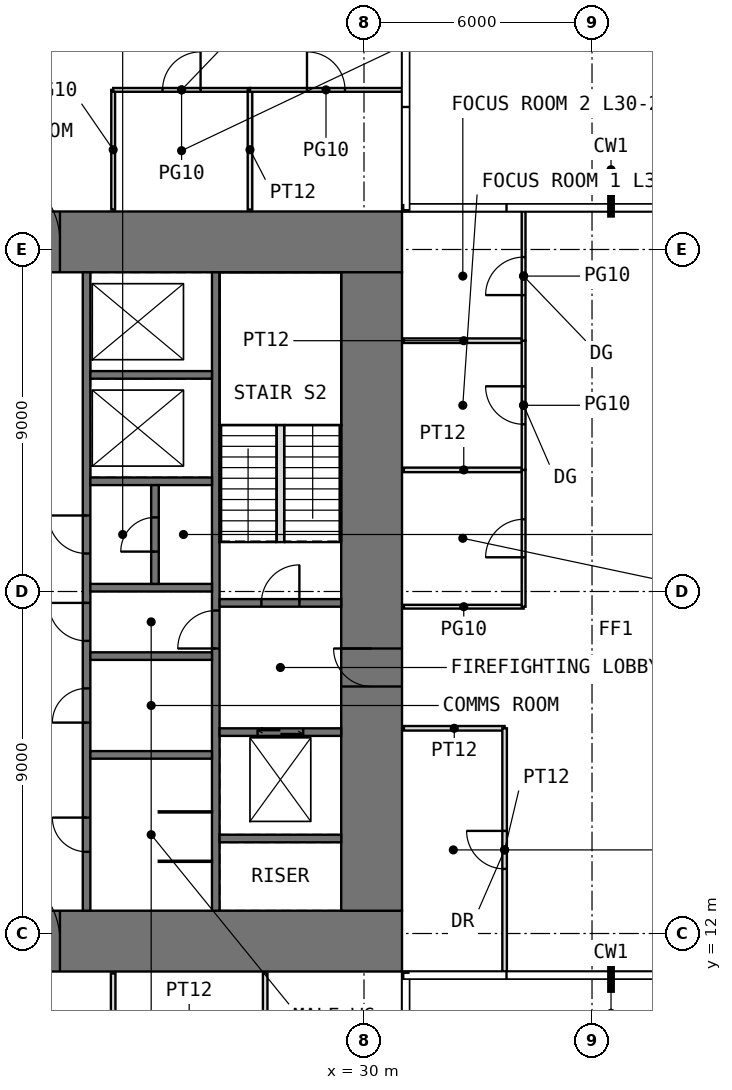
"""IFC4 building model, lengths in metres.
Left out: names, types, materials, properties, quantities, classifications, styles, units other than length and angle.
Written with IfcOpenShell. Run it as: python <this file> out.ifc"""

import sys

from ifc_helpers import new_model, si_unit, direction, frame, frame_2d, origin, place, context, subcontext, project, spatial, rectangle, extrude, element, fill, save


model = new_model("IFC4")
c1 = context("Model", 3, precision=1e-05, world=origin(), true_north=direction((0.0, 1.0)))
c2 = subcontext(c1, "Body", "Model", "MODEL_VIEW")
j1 = project(units=[si_unit("LENGTHUNIT", "METRE"), si_unit("PLANEANGLEUNIT", "RADIAN")], contexts=[c1])
p1 = place(None, origin())
s1 = spatial("IfcSite", under=j1, at=p1, CompositionType="ELEMENT")
p2 = place(p1, origin())
s2 = spatial("IfcBuilding", under=s1, at=p2, CompositionType="ELEMENT")
p3 = place(p2, frame((0.0, 0.0, 128.5)))
s3 = spatial("IfcBuildingStorey", under=s2, at=p3, CompositionType="ELEMENT", Elevation=128.5)
p4 = place(p3, frame((11.0, 11.8, -0.05), z_axis=(0.0, 0.0, 1.0), x_axis=(1.0, 0.0, 0.0)))
e1 = element("IfcWall", 1, at=p4, inside=s3, PredefinedType="SHEAR", context=c2, shape_type="SweptSolid", body=[
    extrude(rectangle(XDim=20.0, YDim=1.6, at=frame_2d((10.0, 0.0))), origin(), (0.0, 0.0, 1.0), 4.0),
])
p5 = place(p4, frame((9.0, 0.0, 0.05)))
e2 = element("IfcOpeningElement", 2, at=p5, cuts=e1, PredefinedType="OPENING", context=c2, shape_type="SweptSolid", body=[
    extrude(rectangle(XDim=2.0, YDim=2.2, at=frame_2d((1.0, 1.1))), frame((0.0, 0.81, 0.0), z_axis=(0.0, -1.0, 0.0), x_axis=(1.0, 0.0, 0.0)), (0.0, 0.0, 1.0), 1.62),
])
p6 = place(p3, frame((11.0, 30.2, -0.05), z_axis=(0.0, 0.0, 1.0), x_axis=(1.0, 0.0, 0.0)))
e3 = element("IfcWall", 3, at=p6, inside=s3, PredefinedType="SHEAR", context=c2, shape_type="SweptSolid", body=[
    extrude(rectangle(XDim=20.0, YDim=1.6, at=frame_2d((10.0, 0.0))), origin(), (0.0, 0.0, 1.0), 4.0),
])
p7 = place(p6, frame((9.0, 0.0, 0.05)))
e4 = element("IfcOpeningElement", 4, at=p7, cuts=e3, PredefinedType="OPENING", context=c2, shape_type="SweptSolid", body=[
    extrude(rectangle(XDim=2.0, YDim=2.2, at=frame_2d((1.0, 1.1))), frame((0.0, 0.81, 0.0), z_axis=(0.0, -1.0, 0.0), x_axis=(1.0, 0.0, 0.0)), (0.0, 0.0, 1.0), 1.62),
])
p8 = place(p3, frame((30.2, 12.6, -0.05), z_axis=(0.0, 0.0, 1.0), x_axis=(0.0, 1.0, 0.0)))
e5 = element("IfcWall", 5, at=p8, inside=s3, PredefinedType="SHEAR", context=c2, shape_type="SweptSolid", body=[
    extrude(rectangle(XDim=16.8, YDim=1.6, at=frame_2d((8.4, 0.0))), origin(), (0.0, 0.0, 1.0), 4.0),
])
p9 = place(p8, frame((5.9, 0.0, 0.05)))
e6 = element("IfcOpeningElement", 6, at=p9, cuts=e5, PredefinedType="OPENING", context=c2, shape_type="SweptSolid", body=[
    extrude(rectangle(XDim=1.0, YDim=2.2, at=frame_2d((0.5, 1.1))), frame((0.0, 0.81, 0.0), z_axis=(0.0, -1.0, 0.0), x_axis=(1.0, 0.0, 0.0)), (0.0, 0.0, 1.0), 1.62),
])
p10 = place(p3, frame((22.7, 12.6, -0.05), z_axis=(0.0, 0.0, 1.0), x_axis=(0.0, 1.0, 0.0)))
e7 = element("IfcWall", 7, at=p10, inside=s3, PredefinedType="SHEAR", context=c2, shape_type="SweptSolid", body=[
    extrude(rectangle(XDim=16.8, YDim=0.2, at=frame_2d((8.4, 0.0))), origin(), (0.0, 0.0, 1.0), 4.0),
])
p11 = place(p10, frame((7.1, 0.0, 0.05)))
e8 = element("IfcOpeningElement", 8, at=p11, cuts=e7, PredefinedType="OPENING", context=c2, shape_type="SweptSolid", body=[
    extrude(rectangle(XDim=1.0, YDim=2.2, at=frame_2d((0.5, 1.1))), frame((0.0, 0.11, 0.0), z_axis=(0.0, -1.0, 0.0), x_axis=(1.0, 0.0, 0.0)), (0.0, 0.0, 1.0), 0.22),
])
p12 = place(p10, frame((1.55, 0.0, 0.05)))
e9 = element("IfcOpeningElement", 9, at=p12, cuts=e7, PredefinedType="OPENING", context=c2, shape_type="SweptSolid", body=[
    extrude(rectangle(XDim=0.9, YDim=2.2, at=frame_2d((0.45, 1.1))), frame((0.0, 0.11, 0.0), z_axis=(0.0, -1.0, 0.0), x_axis=(1.0, 0.0, 0.0)), (0.0, 0.0, 1.0), 0.22),
])
p13 = place(p10, frame((4.95, 0.0, 0.05)))
e10 = element("IfcOpeningElement", 10, at=p13, cuts=e7, PredefinedType="OPENING", context=c2, shape_type="SweptSolid", body=[
    extrude(rectangle(XDim=0.9, YDim=2.2, at=frame_2d((0.45, 1.1))), frame((0.0, 0.11, 0.0), z_axis=(0.0, -1.0, 0.0), x_axis=(1.0, 0.0, 0.0)), (0.0, 0.0, 1.0), 0.22),
])
p14 = place(p10, frame((9.4, 0.0, 0.05)))
e11 = element("IfcOpeningElement", 11, at=p14, cuts=e7, PredefinedType="OPENING", context=c2, shape_type="SweptSolid", body=[
    extrude(rectangle(XDim=1.0, YDim=2.2, at=frame_2d((0.5, 1.1))), frame((0.0, 0.11, 0.0), z_axis=(0.0, -1.0, 0.0), x_axis=(1.0, 0.0, 0.0)), (0.0, 0.0, 1.0), 0.22),
])
p15 = place(p3, frame((26.1, 12.6, -0.05), z_axis=(0.0, 0.0, 1.0), x_axis=(0.0, 1.0, 0.0)))
e12 = element("IfcWall", 12, at=p15, inside=s3, PredefinedType="SHEAR", context=c2, shape_type="SweptSolid", body=[
    extrude(rectangle(XDim=16.8, YDim=0.2, at=frame_2d((8.4, 0.0))), origin(), (0.0, 0.0, 1.0), 4.0),
])
p16 = place(p15, frame((6.9, 0.0, 0.05)))
e13 = element("IfcOpeningElement", 13, at=p16, cuts=e12, PredefinedType="OPENING", context=c2, shape_type="SweptSolid", body=[
    extrude(rectangle(XDim=1.0, YDim=2.2, at=frame_2d((0.5, 1.1))), frame((0.0, 0.11, 0.0), z_axis=(0.0, -1.0, 0.0), x_axis=(1.0, 0.0, 0.0)), (0.0, 0.0, 1.0), 0.22),
])
for number, where, z_axis, x_axis in (
    (14, (22.8, 16.7, -0.05), (0.0, 0.0, 1.0), (1.0, 0.0, 0.0)),
    (15, (22.8, 19.3, -0.05), (0.0, 0.0, 1.0), (1.0, 0.0, 0.0)),
    (16, (22.8, 21.1, -0.05), (0.0, 0.0, 1.0), (1.0, 0.0, 0.0)),
    (17, (22.8, 23.9, -0.05), (0.0, 0.0, 1.0), (1.0, 0.0, 0.0)),
    (18, (22.8, 26.7, -0.05), (0.0, 0.0, 1.0), (1.0, 0.0, 0.0)),
    (19, (26.2, 14.5, -0.05), (0.0, 0.0, 1.0), (1.0, 0.0, 0.0)),
):
    element("IfcWall", number, at=place(p3, frame(where, z_axis=z_axis, x_axis=x_axis)), inside=s3, PredefinedType="SHEAR", context=c2, shape_type="SweptSolid", body=[
        extrude(rectangle(XDim=3.2, YDim=0.2, at=frame_2d((1.6, 0.0))), origin(), (0.0, 0.0, 1.0), 4.0),
    ])
p17 = place(p3, frame((26.2, 17.3, -0.05), z_axis=(0.0, 0.0, 1.0), x_axis=(1.0, 0.0, 0.0)))
e20 = element("IfcWall", 20, at=p17, inside=s3, PredefinedType="SHEAR", context=c2, shape_type="SweptSolid", body=[
    extrude(rectangle(XDim=3.2, YDim=0.2, at=frame_2d((1.6, 0.0))), origin(), (0.0, 0.0, 1.0), 4.0),
])
p18 = place(p17, frame((1.0, 0.0, 0.05)))
e21 = element("IfcOpeningElement", 21, at=p18, cuts=e20, PredefinedType="OPENING", context=c2, shape_type="SweptSolid", body=[
    extrude(rectangle(XDim=1.2, YDim=2.2, at=frame_2d((0.6, 1.1))), frame((0.0, 0.11, 0.0), z_axis=(0.0, -1.0, 0.0), x_axis=(1.0, 0.0, 0.0)), (0.0, 0.0, 1.0), 0.22),
])
p19 = place(p3, frame((26.2, 20.7, -0.05), z_axis=(0.0, 0.0, 1.0), x_axis=(1.0, 0.0, 0.0)))
e22 = element("IfcWall", 22, at=p19, inside=s3, PredefinedType="SHEAR", context=c2, shape_type="SweptSolid", body=[
    extrude(rectangle(XDim=3.2, YDim=0.2, at=frame_2d((1.6, 0.0))), origin(), (0.0, 0.0, 1.0), 4.0),
])
p20 = place(p19, frame((1.1, 0.0, 0.05)))
e23 = element("IfcOpeningElement", 23, at=p20, cuts=e22, PredefinedType="OPENING", context=c2, shape_type="SweptSolid", body=[
    extrude(rectangle(XDim=1.0, YDim=2.2, at=frame_2d((0.5, 1.1))), frame((0.0, 0.11, 0.0), z_axis=(0.0, -1.0, 0.0), x_axis=(1.0, 0.0, 0.0)), (0.0, 0.0, 1.0), 0.22),
])
for number, where, z_axis, x_axis in (
    (24, (24.6, 13.9, 0.0), (0.0, 0.0, 1.0), (1.0, 0.0, 0.0)),
    (25, (24.6, 15.2, 0.0), (0.0, 0.0, 1.0), (1.0, 0.0, 0.0)),
):
    element("IfcWall", number, at=place(p3, frame(where, z_axis=z_axis, x_axis=x_axis)), inside=s3, PredefinedType="PARTITIONING", context=c2, shape_type="SweptSolid", body=[
        extrude(rectangle(XDim=1.4, YDim=0.03, at=frame_2d((0.7, 0.0))), origin(), (0.0, 0.0, 1.0), 3.75),
    ])
p21 = place(p3, frame((24.5, 21.2, -0.05), z_axis=(0.0, 0.0, 1.0), x_axis=(0.0, 1.0, 0.0)))
e26 = element("IfcWall", 26, at=p21, inside=s3, PredefinedType="SHEAR", context=c2, shape_type="SweptSolid", body=[
    extrude(rectangle(XDim=2.6, YDim=0.2, at=frame_2d((1.3, 0.0))), origin(), (0.0, 0.0, 1.0), 4.0),
])
p22 = place(p21, frame((0.85, 0.0, 0.05)))
e27 = element("IfcOpeningElement", 27, at=p22, cuts=e26, PredefinedType="OPENING", context=c2, shape_type="SweptSolid", body=[
    extrude(rectangle(XDim=0.9, YDim=2.2, at=frame_2d((0.45, 1.1))), frame((0.0, 0.11, 0.0), z_axis=(0.0, -1.0, 0.0), x_axis=(1.0, 0.0, 0.0)), (0.0, 0.0, 1.0), 0.22),
])
p23 = place(p3, frame((23.4, 8.3, 0.0), z_axis=(0.0, 0.0, 1.0), x_axis=(0.0, 1.0, 0.0)))
e28 = element("IfcWall", 28, at=p23, inside=s3, PredefinedType="PARTITIONING", context=c2, shape_type="SweptSolid", body=[
    extrude(rectangle(XDim=2.65, YDim=0.12, at=frame_2d((1.325, 0.0))), origin(), (0.0, 0.0, 1.0), 3.75),
])
p24 = place(p3, frame((23.4, 31.05, 0.0), z_axis=(0.0, 0.0, 1.0), x_axis=(0.0, 1.0, 0.0)))
e29 = element("IfcWall", 29, at=p24, inside=s3, PredefinedType="PARTITIONING", context=c2, shape_type="SweptSolid", body=[
    extrude(rectangle(XDim=3.15, YDim=0.1, at=frame_2d((1.575, 0.0))), origin(), (0.0, 0.0, 1.0), 3.75),
])
p25 = place(p3, frame((23.4, 34.2, 0.0), z_axis=(0.0, 0.0, 1.0), x_axis=(1.0, 0.0, 0.0)))
e30 = element("IfcWall", 30, at=p25, inside=s3, PredefinedType="PARTITIONING", context=c2, shape_type="SweptSolid", body=[
    extrude(rectangle(XDim=3.6, YDim=0.1, at=frame_2d((1.8, 0.0))), origin(), (0.0, 0.0, 1.0), 3.75),
])
p26 = place(p25, frame((1.3, 0.0, 0.0)))
e31 = element("IfcOpeningElement", 31, at=p26, cuts=e30, PredefinedType="OPENING", context=c2, shape_type="SweptSolid", body=[
    extrude(rectangle(XDim=1.0, YDim=2.4, at=frame_2d((0.5, 1.2))), frame((0.0, 0.06, 0.0), z_axis=(0.0, -1.0, 0.0), x_axis=(1.0, 0.0, 0.0)), (0.0, 0.0, 1.0), 0.12),
])
p27 = place(p3, frame((27.0, 31.05, 0.0), z_axis=(0.0, 0.0, 1.0), x_axis=(0.0, 1.0, 0.0)))
e32 = element("IfcWall", 32, at=p27, inside=s3, PredefinedType="PARTITIONING", context=c2, shape_type="SweptSolid", body=[
    extrude(rectangle(XDim=3.15, YDim=0.12, at=frame_2d((1.575, 0.0))), origin(), (0.0, 0.0, 1.0), 3.75),
])
p28 = place(p3, frame((27.0, 34.2, 0.0), z_axis=(0.0, 0.0, 1.0), x_axis=(1.0, 0.0, 0.0)))
e33 = element("IfcWall", 33, at=p28, inside=s3, PredefinedType="PARTITIONING", context=c2, shape_type="SweptSolid", body=[
    extrude(rectangle(XDim=4.0, YDim=0.1, at=frame_2d((2.0, 0.0))), origin(), (0.0, 0.0, 1.0), 3.75),
])
p29 = place(p28, frame((1.5, 0.0, 0.0)))
e34 = element("IfcOpeningElement", 34, at=p29, cuts=e33, PredefinedType="OPENING", context=c2, shape_type="SweptSolid", body=[
    extrude(rectangle(XDim=1.0, YDim=2.4, at=frame_2d((0.5, 1.2))), frame((0.0, 0.06, 0.0), z_axis=(0.0, -1.0, 0.0), x_axis=(1.0, 0.0, 0.0)), (0.0, 0.0, 1.0), 0.12),
])
for number, where, z_axis, x_axis in (
    (35, (27.4, 8.3, 0.0), (0.0, 0.0, 1.0), (0.0, 1.0, 0.0)),
    (36, (31.05, 17.4, 0.0), (0.0, 0.0, 1.0), (1.0, 0.0, 0.0)),
):
    element("IfcWall", number, at=place(p3, frame(where, z_axis=z_axis, x_axis=x_axis)), inside=s3, PredefinedType="PARTITIONING", context=c2, shape_type="SweptSolid", body=[
        extrude(rectangle(XDim=2.65, YDim=0.12, at=frame_2d((1.325, 0.0))), origin(), (0.0, 0.0, 1.0), 3.75),
    ])
p30 = place(p3, frame((31.05, 20.6, 0.0), z_axis=(0.0, 0.0, 1.0), x_axis=(1.0, 0.0, 0.0)))
e37 = element("IfcWall", 37, at=p30, inside=s3, PredefinedType="PARTITIONING", context=c2, shape_type="SweptSolid", body=[
    extrude(rectangle(XDim=3.15, YDim=0.1, at=frame_2d((1.575, 0.0))), origin(), (0.0, 0.0, 1.0), 3.75),
])
for number, where, z_axis, x_axis in (
    (38, (31.05, 24.2, 0.0), (0.0, 0.0, 1.0), (1.0, 0.0, 0.0)),
    (39, (31.05, 27.6, 0.0), (0.0, 0.0, 1.0), (1.0, 0.0, 0.0)),
):
    element("IfcWall", number, at=place(p3, frame(where, z_axis=z_axis, x_axis=x_axis)), inside=s3, PredefinedType="PARTITIONING", context=c2, shape_type="SweptSolid", body=[
        extrude(rectangle(XDim=3.15, YDim=0.12, at=frame_2d((1.575, 0.0))), origin(), (0.0, 0.0, 1.0), 3.75),
    ])
p31 = place(p3, frame((33.7, 11.0, 0.0), z_axis=(0.0, 0.0, 1.0), x_axis=(0.0, 1.0, 0.0)))
e40 = element("IfcWall", 40, at=p31, inside=s3, PredefinedType="PARTITIONING", context=c2, shape_type="SweptSolid", body=[
    extrude(rectangle(XDim=6.4, YDim=0.12, at=frame_2d((3.2, 0.0))), origin(), (0.0, 0.0, 1.0), 3.75),
])
p32 = place(p31, frame((2.7, 0.0, 0.0)))
e41 = element("IfcOpeningElement", 41, at=p32, cuts=e40, PredefinedType="OPENING", context=c2, shape_type="SweptSolid", body=[
    extrude(rectangle(XDim=1.0, YDim=2.2, at=frame_2d((0.5, 1.1))), frame((0.0, 0.07, 0.0), z_axis=(0.0, -1.0, 0.0), x_axis=(1.0, 0.0, 0.0)), (0.0, 0.0, 1.0), 0.14),
])
p33 = place(p3, frame((34.2, 20.6, 0.0), z_axis=(0.0, 0.0, 1.0), x_axis=(0.0, 1.0, 0.0)))
e42 = element("IfcWall", 42, at=p33, inside=s3, PredefinedType="PARTITIONING", context=c2, shape_type="SweptSolid", body=[
    extrude(rectangle(XDim=3.6, YDim=0.1, at=frame_2d((1.8, 0.0))), origin(), (0.0, 0.0, 1.0), 3.75),
])
p34 = place(p33, frame((1.3, 0.0, 0.0)))
e43 = element("IfcOpeningElement", 43, at=p34, cuts=e42, PredefinedType="OPENING", context=c2, shape_type="SweptSolid", body=[
    extrude(rectangle(XDim=1.0, YDim=2.4, at=frame_2d((0.5, 1.2))), frame((0.0, 0.06, 0.0), z_axis=(0.0, -1.0, 0.0), x_axis=(1.0, 0.0, 0.0)), (0.0, 0.0, 1.0), 0.12),
])
p35 = place(p3, frame((34.2, 24.2, 0.0), z_axis=(0.0, 0.0, 1.0), x_axis=(0.0, 1.0, 0.0)))
e44 = element("IfcWall", 44, at=p35, inside=s3, PredefinedType="PARTITIONING", context=c2, shape_type="SweptSolid", body=[
    extrude(rectangle(XDim=3.4, YDim=0.1, at=frame_2d((1.7, 0.0))), origin(), (0.0, 0.0, 1.0), 3.75),
])
p36 = place(p35, frame((1.2, 0.0, 0.0)))
e45 = element("IfcOpeningElement", 45, at=p36, cuts=e44, PredefinedType="OPENING", context=c2, shape_type="SweptSolid", body=[
    extrude(rectangle(XDim=1.0, YDim=2.4, at=frame_2d((0.5, 1.2))), frame((0.0, 0.06, 0.0), z_axis=(0.0, -1.0, 0.0), x_axis=(1.0, 0.0, 0.0)), (0.0, 0.0, 1.0), 0.12),
])
p37 = place(p3, frame((34.2, 27.6, 0.0), z_axis=(0.0, 0.0, 1.0), x_axis=(0.0, 1.0, 0.0)))
e46 = element("IfcWall", 46, at=p37, inside=s3, PredefinedType="PARTITIONING", context=c2, shape_type="SweptSolid", body=[
    extrude(rectangle(XDim=3.4, YDim=0.1, at=frame_2d((1.7, 0.0))), origin(), (0.0, 0.0, 1.0), 3.75),
])
p38 = place(p37, frame((1.2, 0.0, 0.0)))
e47 = element("IfcOpeningElement", 47, at=p38, cuts=e46, PredefinedType="OPENING", context=c2, shape_type="SweptSolid", body=[
    extrude(rectangle(XDim=1.0, YDim=2.4, at=frame_2d((0.5, 1.2))), frame((0.0, 0.06, 0.0), z_axis=(0.0, -1.0, 0.0), x_axis=(1.0, 0.0, 0.0)), (0.0, 0.0, 1.0), 0.12),
])
p39 = place(p3, frame((27.8, 22.3, 0.0), z_axis=(0.0, 0.0, 1.0), x_axis=(0.0, 1.0, 0.0)))
e48 = element("IfcWall", 48, at=p39, inside=s3, PredefinedType="PARTITIONING", context=c2, shape_type="SweptSolid", body=[
    extrude(rectangle(XDim=3.08, YDim=0.2, at=frame_2d((1.54, 0.0))), origin(), (0.0, 0.0, 1.0), 4.0),
])
p40 = place(p5, origin())
e49 = element("IfcDoor", 49, at=p40, inside=s3, OperationType="DOUBLE_DOOR_SINGLE_SWING", PredefinedType="DOOR", context=c2, shape_type="SweptSolid", body=[
    extrude(rectangle(XDim=2.0, YDim=2.2, at=frame_2d((1.0, 1.1))), frame((0.0, 0.025, 0.0), z_axis=(0.0, -1.0, 0.0), x_axis=(1.0, 0.0, 0.0)), (0.0, 0.0, 1.0), 0.05),
])
fill(e2, e49)
p41 = place(p7, origin())
e50 = element("IfcDoor", 50, at=p41, inside=s3, OperationType="DOUBLE_DOOR_SINGLE_SWING", PredefinedType="DOOR", context=c2, shape_type="SweptSolid", body=[
    extrude(rectangle(XDim=2.0, YDim=2.2, at=frame_2d((1.0, 1.1))), frame((0.0, 0.025, 0.0), z_axis=(0.0, -1.0, 0.0), x_axis=(1.0, 0.0, 0.0)), (0.0, 0.0, 1.0), 0.05),
])
fill(e4, e50)
p42 = place(p9, origin())
e51 = element("IfcDoor", 51, at=p42, inside=s3, OperationType="SINGLE_SWING_RIGHT", PredefinedType="DOOR", context=c2, shape_type="SweptSolid", body=[
    extrude(rectangle(XDim=1.0, YDim=2.2, at=frame_2d((0.5, 1.1))), frame((0.0, 0.025, 0.0), z_axis=(0.0, -1.0, 0.0), x_axis=(1.0, 0.0, 0.0)), (0.0, 0.0, 1.0), 0.05),
])
fill(e6, e51)
p43 = place(p20, origin())
e52 = element("IfcDoor", 52, at=p43, inside=s3, OperationType="SINGLE_SWING_RIGHT", PredefinedType="DOOR", context=c2, shape_type="SweptSolid", body=[
    extrude(rectangle(XDim=1.0, YDim=2.2, at=frame_2d((0.5, 1.1))), frame((0.0, 0.025, 0.0), z_axis=(0.0, -1.0, 0.0), x_axis=(1.0, 0.0, 0.0)), (0.0, 0.0, 1.0), 0.05),
])
fill(e23, e52)
p44 = place(p16, origin())
e53 = element("IfcDoor", 53, at=p44, inside=s3, OperationType="SINGLE_SWING_LEFT", PredefinedType="DOOR", context=c2, shape_type="SweptSolid", body=[
    extrude(rectangle(XDim=1.0, YDim=2.2, at=frame_2d((0.5, 1.1))), frame((0.0, 0.025, 0.0), z_axis=(0.0, -1.0, 0.0), x_axis=(1.0, 0.0, 0.0)), (0.0, 0.0, 1.0), 0.05),
])
fill(e13, e53)
p45 = place(p11, origin())
e54 = element("IfcDoor", 54, at=p45, inside=s3, OperationType="SINGLE_SWING_RIGHT", PredefinedType="DOOR", context=c2, shape_type="SweptSolid", body=[
    extrude(rectangle(XDim=1.0, YDim=2.2, at=frame_2d((0.5, 1.1))), frame((0.0, 0.025, 0.0), z_axis=(0.0, -1.0, 0.0), x_axis=(1.0, 0.0, 0.0)), (0.0, 0.0, 1.0), 0.05),
])
fill(e8, e54)
p46 = place(p12, origin())
e55 = element("IfcDoor", 55, at=p46, inside=s3, OperationType="SINGLE_SWING_RIGHT", PredefinedType="DOOR", context=c2, shape_type="SweptSolid", body=[
    extrude(rectangle(XDim=0.9, YDim=2.2, at=frame_2d((0.45, 1.1))), frame((0.0, 0.025, 0.0), z_axis=(0.0, -1.0, 0.0), x_axis=(1.0, 0.0, 0.0)), (0.0, 0.0, 1.0), 0.05),
])
fill(e9, e55)
p47 = place(p13, origin())
e56 = element("IfcDoor", 56, at=p47, inside=s3, OperationType="SINGLE_SWING_LEFT", PredefinedType="DOOR", context=c2, shape_type="SweptSolid", body=[
    extrude(rectangle(XDim=0.9, YDim=2.2, at=frame_2d((0.45, 1.1))), frame((0.0, 0.025, 0.0), z_axis=(0.0, -1.0, 0.0), x_axis=(1.0, 0.0, 0.0)), (0.0, 0.0, 1.0), 0.05),
])
fill(e10, e56)
p48 = place(p14, origin())
e57 = element("IfcDoor", 57, at=p48, inside=s3, OperationType="SINGLE_SWING_RIGHT", PredefinedType="DOOR", context=c2, shape_type="SweptSolid", body=[
    extrude(rectangle(XDim=1.0, YDim=2.2, at=frame_2d((0.5, 1.1))), frame((0.0, 0.025, 0.0), z_axis=(0.0, -1.0, 0.0), x_axis=(1.0, 0.0, 0.0)), (0.0, 0.0, 1.0), 0.05),
])
fill(e11, e57)
p49 = place(p22, origin())
e58 = element("IfcDoor", 58, at=p49, inside=s3, OperationType="SINGLE_SWING_LEFT", PredefinedType="DOOR", context=c2, shape_type="SweptSolid", body=[
    extrude(rectangle(XDim=0.9, YDim=2.2, at=frame_2d((0.45, 1.1))), frame((0.0, 0.025, 0.0), z_axis=(0.0, -1.0, 0.0), x_axis=(1.0, 0.0, 0.0)), (0.0, 0.0, 1.0), 0.05),
])
fill(e27, e58)
p50 = place(p32, origin())
e59 = element("IfcDoor", 59, at=p50, inside=s3, OperationType="SINGLE_SWING_RIGHT", PredefinedType="DOOR", context=c2, shape_type="SweptSolid", body=[
    extrude(rectangle(XDim=1.0, YDim=2.2, at=frame_2d((0.5, 1.1))), frame((0.0, 0.025, 0.0), z_axis=(0.0, -1.0, 0.0), x_axis=(1.0, 0.0, 0.0)), (0.0, 0.0, 1.0), 0.05),
])
fill(e41, e59)
p51 = place(p34, origin())
e60 = element("IfcDoor", 60, at=p51, inside=s3, OperationType="SINGLE_SWING_LEFT", PredefinedType="DOOR", context=c2, shape_type="SweptSolid", body=[
    extrude(rectangle(XDim=1.0, YDim=2.4, at=frame_2d((0.5, 1.2))), frame((0.0, 0.025, 0.0), z_axis=(0.0, -1.0, 0.0), x_axis=(1.0, 0.0, 0.0)), (0.0, 0.0, 1.0), 0.05),
])
fill(e43, e60)
p52 = place(p36, origin())
e61 = element("IfcDoor", 61, at=p52, inside=s3, OperationType="SINGLE_SWING_RIGHT", PredefinedType="DOOR", context=c2, shape_type="SweptSolid", body=[
    extrude(rectangle(XDim=1.0, YDim=2.4, at=frame_2d((0.5, 1.2))), frame((0.0, 0.025, 0.0), z_axis=(0.0, -1.0, 0.0), x_axis=(1.0, 0.0, 0.0)), (0.0, 0.0, 1.0), 0.05),
])
fill(e45, e61)
p53 = place(p38, origin())
e62 = element("IfcDoor", 62, at=p53, inside=s3, OperationType="SINGLE_SWING_LEFT", PredefinedType="DOOR", context=c2, shape_type="SweptSolid", body=[
    extrude(rectangle(XDim=1.0, YDim=2.4, at=frame_2d((0.5, 1.2))), frame((0.0, 0.025, 0.0), z_axis=(0.0, -1.0, 0.0), x_axis=(1.0, 0.0, 0.0)), (0.0, 0.0, 1.0), 0.05),
])
fill(e47, e62)
p54 = place(p26, origin())
e63 = element("IfcDoor", 63, at=p54, inside=s3, OperationType="SINGLE_SWING_RIGHT", PredefinedType="DOOR", context=c2, shape_type="SweptSolid", body=[
    extrude(rectangle(XDim=1.0, YDim=2.4, at=frame_2d((0.5, 1.2))), frame((0.0, 0.025, 0.0), z_axis=(0.0, -1.0, 0.0), x_axis=(1.0, 0.0, 0.0)), (0.0, 0.0, 1.0), 0.05),
])
fill(e31, e63)
p55 = place(p29, origin())
e64 = element("IfcDoor", 64, at=p55, inside=s3, OperationType="SINGLE_SWING_LEFT", PredefinedType="DOOR", context=c2, shape_type="SweptSolid", body=[
    extrude(rectangle(XDim=1.0, YDim=2.4, at=frame_2d((0.5, 1.2))), frame((0.0, 0.025, 0.0), z_axis=(0.0, -1.0, 0.0), x_axis=(1.0, 0.0, 0.0)), (0.0, 0.0, 1.0), 0.05),
])
fill(e34, e64)
p56 = place(p18, origin())
e65 = element("IfcDoor", 65, at=p56, inside=s3, OperationType="DOUBLE_DOOR_SLIDING", PredefinedType="DOOR", context=c2, shape_type="SweptSolid", body=[
    extrude(rectangle(XDim=1.2, YDim=2.2, at=frame_2d((0.6, 1.1))), frame((0.0, 0.025, 0.0), z_axis=(0.0, -1.0, 0.0), x_axis=(1.0, 0.0, 0.0)), (0.0, 0.0, 1.0), 0.05),
])
fill(e21, e65)
save(model, sys.argv[1])
